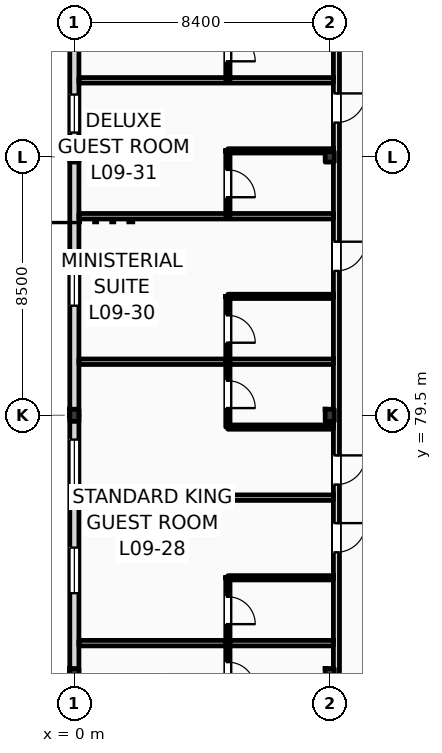
"""IFC4 building model, lengths in metres.
Left out: names, types, materials, properties, quantities, classifications, styles, units other than length and angle.
Written with IfcOpenShell. Run it as: python <this file> out.ifc"""

import sys

from ifc_helpers import new_model, si_unit, direction, frame, frame_2d, origin, origin_2d, place, context, subcontext, project, spatial, rectangle, i_section, extrude, element, fill, save


model = new_model("IFC4")
c1 = context("Model", 3, precision=1e-05, world=origin(), true_north=direction((0.0, 1.0)))
c2 = subcontext(c1, "Body", "Model", "MODEL_VIEW")
j1 = project(units=[si_unit("LENGTHUNIT", "METRE"), si_unit("PLANEANGLEUNIT", "RADIAN")], contexts=[c1])
p1 = place(None, origin())
s1 = spatial("IfcSite", under=j1, at=p1, CompositionType="ELEMENT")
p2 = place(p1, origin())
s2 = spatial("IfcBuilding", under=s1, at=p2, CompositionType="ELEMENT")
p3 = place(p2, frame((0.0, 0.0, 39.0)))
s3 = spatial("IfcBuildingStorey", under=s2, at=p3, CompositionType="ELEMENT", Elevation=39.0)
p4 = place(p3, frame((0.0, 71.0, 0.0), z_axis=(0.0, 0.0, 1.0), x_axis=(1.0, 0.0, 0.0)))
e1 = element("IfcColumn", 1, at=p4, inside=s3, PredefinedType="COLUMN", context=c2, shape_type="SweptSolid", body=[
    extrude(i_section(OverallWidth=0.3, OverallDepth=0.34, WebThickness=0.012, FlangeThickness=0.021, FilletRadius=0.027, at=origin_2d()), origin(), (0.0, 0.0, 1.0), 3.6),
])
p5 = place(p3, frame((0.0, 79.5, 0.0), z_axis=(0.0, 0.0, 1.0), x_axis=(1.0, 0.0, 0.0)))
e2 = element("IfcColumn", 2, at=p5, inside=s3, PredefinedType="COLUMN", context=c2, shape_type="SweptSolid", body=[
    extrude(i_section(OverallWidth=0.3, OverallDepth=0.4, WebThickness=0.013, FlangeThickness=0.024, FilletRadius=0.027, at=origin_2d()), origin(), (0.0, 0.0, 1.0), 3.6),
])
for number, where, z_axis, x_axis in (
    (3, (0.0, 88.0, 0.0), (0.0, 0.0, 1.0), (1.0, 0.0, 0.0)),
    (4, (8.4, 71.0, 0.0), (0.0, 0.0, 1.0), (1.0, 0.0, 0.0)),
):
    element("IfcColumn", number, at=place(p3, frame(where, z_axis=z_axis, x_axis=x_axis)), inside=s3, PredefinedType="COLUMN", context=c2, shape_type="SweptSolid", body=[
        extrude(i_section(OverallWidth=0.3, OverallDepth=0.34, WebThickness=0.012, FlangeThickness=0.021, FilletRadius=0.027, at=origin_2d()), origin(), (0.0, 0.0, 1.0), 3.6),
    ])
p6 = place(p3, frame((8.4, 79.5, 0.0), z_axis=(0.0, 0.0, 1.0), x_axis=(1.0, 0.0, 0.0)))
e5 = element("IfcColumn", 5, at=p6, inside=s3, PredefinedType="COLUMN", context=c2, shape_type="SweptSolid", body=[
    extrude(i_section(OverallWidth=0.3, OverallDepth=0.4, WebThickness=0.013, FlangeThickness=0.024, FilletRadius=0.027, at=origin_2d()), origin(), (0.0, 0.0, 1.0), 3.6),
])
p7 = place(p3, frame((8.4, 88.0, 0.0), z_axis=(0.0, 0.0, 1.0), x_axis=(1.0, 0.0, 0.0)))
e6 = element("IfcColumn", 6, at=p7, inside=s3, PredefinedType="COLUMN", context=c2, shape_type="SweptSolid", body=[
    extrude(i_section(OverallWidth=0.3, OverallDepth=0.34, WebThickness=0.012, FlangeThickness=0.021, FilletRadius=0.027, at=origin_2d()), origin(), (0.0, 0.0, 1.0), 3.6),
])
p8 = place(p3, frame((0.0, 71.0, 0.0), z_axis=(0.0, 0.0, 1.0), x_axis=(0.0, 1.0, 0.0)))
e7 = element("IfcWall", 7, at=p8, inside=s3, PredefinedType="STANDARD", context=c2, shape_type="SweptSolid", body=[
    extrude(rectangle(XDim=8.5, YDim=0.3, at=frame_2d((4.25, 0.0))), origin(), (0.0, 0.0, 1.0), 2.91),
])
p9 = place(p8, frame((2.648, 0.0, 0.9)))
e8 = element("IfcOpeningElement", 8, at=p9, cuts=e7, PredefinedType="OPENING", context=c2, shape_type="SweptSolid", body=[
    extrude(rectangle(XDim=1.5, YDim=1.83, at=frame_2d((0.75, 0.915))), frame((0.0, 0.16, 0.0), z_axis=(0.0, -1.0, 0.0), x_axis=(1.0, 0.0, 0.0)), (0.0, 0.0, 1.0), 0.32),
])
p10 = place(p8, frame((6.2, 0.0, 0.9)))
e9 = element("IfcOpeningElement", 9, at=p10, cuts=e7, PredefinedType="OPENING", context=c2, shape_type="SweptSolid", body=[
    extrude(rectangle(XDim=1.5, YDim=1.83, at=frame_2d((0.75, 0.915))), frame((0.0, 0.16, 0.0), z_axis=(0.0, -1.0, 0.0), x_axis=(1.0, 0.0, 0.0)), (0.0, 0.0, 1.0), 0.32),
])
p11 = place(p3, frame((0.0, 79.5, 0.0), z_axis=(0.0, 0.0, 1.0), x_axis=(0.0, 1.0, 0.0)))
e10 = element("IfcWall", 10, at=p11, inside=s3, PredefinedType="STANDARD", context=c2, shape_type="SweptSolid", body=[
    extrude(rectangle(XDim=8.5, YDim=0.3, at=frame_2d((4.25, 0.0))), origin(), (0.0, 0.0, 1.0), 3.01),
])
p12 = place(p11, frame((3.605, 0.0, 0.9)))
e11 = element("IfcOpeningElement", 11, at=p12, cuts=e10, PredefinedType="OPENING", context=c2, shape_type="SweptSolid", body=[
    extrude(rectangle(XDim=1.1, YDim=1.5, at=frame_2d((0.55, 0.75))), frame((0.0, 0.16, 0.0), z_axis=(0.0, -1.0, 0.0), x_axis=(1.0, 0.0, 0.0)), (0.0, 0.0, 1.0), 0.32),
])
p13 = place(p3, frame((0.0, 88.0, 0.0), z_axis=(0.0, 0.0, 1.0), x_axis=(0.0, 1.0, 0.0)))
e12 = element("IfcWall", 12, at=p13, inside=s3, PredefinedType="STANDARD", context=c2, shape_type="SweptSolid", body=[
    extrude(rectangle(XDim=7.5, YDim=0.3, at=frame_2d((3.75, 0.0))), origin(), (0.0, 0.0, 1.0), 3.38),
])
p14 = place(p13, frame((0.8, 0.0, 0.9)))
e13 = element("IfcOpeningElement", 13, at=p14, cuts=e12, PredefinedType="OPENING", context=c2, shape_type="SweptSolid", body=[
    extrude(rectangle(XDim=1.25, YDim=1.6, at=frame_2d((0.625, 0.8))), frame((0.0, 0.16, 0.0), z_axis=(0.0, -1.0, 0.0), x_axis=(1.0, 0.0, 0.0)), (0.0, 0.0, 1.0), 0.32),
])
p15 = place(p13, frame((4.159, 0.0, 0.9)))
e14 = element("IfcOpeningElement", 14, at=p15, cuts=e12, PredefinedType="OPENING", context=c2, shape_type="SweptSolid", body=[
    extrude(rectangle(XDim=1.4, YDim=1.7, at=frame_2d((0.7, 0.85))), frame((0.0, 0.16, 0.0), z_axis=(0.0, -1.0, 0.0), x_axis=(1.0, 0.0, 0.0)), (0.0, 0.0, 1.0), 0.32),
])
p16 = place(p3, frame((8.62, 62.64, 0.0), z_axis=(0.0, 0.0, 1.0), x_axis=(0.0, 1.0, 0.0)))
e15 = element("IfcWall", 15, at=p16, inside=s3, PredefinedType="PARTITIONING", context=c2, shape_type="SweptSolid", body=[
    extrude(rectangle(XDim=32.66, YDim=0.2, at=frame_2d((16.33, 0.0))), origin(), (0.0, 0.0, 1.0), 2.91),
])
p17 = place(p16, frame((3.122, 0.0, 0.0)))
e16 = element("IfcOpeningElement", 16, at=p17, cuts=e15, PredefinedType="OPENING", context=c2, shape_type="SweptSolid", body=[
    extrude(rectangle(XDim=0.96, YDim=2.2, at=frame_2d((0.48, 1.1))), frame((0.0, 0.11, 0.0), z_axis=(0.0, -1.0, 0.0), x_axis=(1.0, 0.0, 0.0)), (0.0, 0.0, 1.0), 0.22),
])
p18 = place(p16, frame((5.575, 0.0, 0.0)))
e17 = element("IfcOpeningElement", 17, at=p18, cuts=e15, PredefinedType="OPENING", context=c2, shape_type="SweptSolid", body=[
    extrude(rectangle(XDim=0.96, YDim=2.2, at=frame_2d((0.48, 1.1))), frame((0.0, 0.11, 0.0), z_axis=(0.0, -1.0, 0.0), x_axis=(1.0, 0.0, 0.0)), (0.0, 0.0, 1.0), 0.22),
])
p19 = place(p16, frame((12.353, 0.0, 0.0)))
e18 = element("IfcOpeningElement", 18, at=p19, cuts=e15, PredefinedType="OPENING", context=c2, shape_type="SweptSolid", body=[
    extrude(rectangle(XDim=0.96, YDim=2.2, at=frame_2d((0.48, 1.1))), frame((0.0, 0.11, 0.0), z_axis=(0.0, -1.0, 0.0), x_axis=(1.0, 0.0, 0.0)), (0.0, 0.0, 1.0), 0.22),
])
p20 = place(p16, frame((14.581, 0.0, 0.0)))
e19 = element("IfcOpeningElement", 19, at=p20, cuts=e15, PredefinedType="OPENING", context=c2, shape_type="SweptSolid", body=[
    extrude(rectangle(XDim=0.96, YDim=2.2, at=frame_2d((0.48, 1.1))), frame((0.0, 0.11, 0.0), z_axis=(0.0, -1.0, 0.0), x_axis=(1.0, 0.0, 0.0)), (0.0, 0.0, 1.0), 0.22),
])
p21 = place(p16, frame((21.61, 0.0, 0.0)))
e20 = element("IfcOpeningElement", 20, at=p21, cuts=e15, PredefinedType="OPENING", context=c2, shape_type="SweptSolid", body=[
    extrude(rectangle(XDim=0.96, YDim=2.2, at=frame_2d((0.48, 1.1))), frame((0.0, 0.11, 0.0), z_axis=(0.0, -1.0, 0.0), x_axis=(1.0, 0.0, 0.0)), (0.0, 0.0, 1.0), 0.22),
])
p22 = place(p16, frame((26.488, 0.0, 0.0)))
e21 = element("IfcOpeningElement", 21, at=p22, cuts=e15, PredefinedType="OPENING", context=c2, shape_type="SweptSolid", body=[
    extrude(rectangle(XDim=0.96, YDim=2.2, at=frame_2d((0.48, 1.1))), frame((0.0, 0.11, 0.0), z_axis=(0.0, -1.0, 0.0), x_axis=(1.0, 0.0, 0.0)), (0.0, 0.0, 1.0), 0.22),
])
p23 = place(p16, frame((30.814, 0.0, 0.0)))
e22 = element("IfcOpeningElement", 22, at=p23, cuts=e15, PredefinedType="OPENING", context=c2, shape_type="SweptSolid", body=[
    extrude(rectangle(XDim=0.96, YDim=2.2, at=frame_2d((0.48, 1.1))), frame((0.0, 0.11, 0.0), z_axis=(0.0, -1.0, 0.0), x_axis=(1.0, 0.0, 0.0)), (0.0, 0.0, 1.0), 0.22),
])
p24 = place(p3, frame((0.15, 72.005, 0.0), z_axis=(0.0, 0.0, 1.0), x_axis=(1.0, 0.0, 0.0)))
e23 = element("IfcWall", 23, at=p24, inside=s3, PredefinedType="PARTITIONING", context=c2, shape_type="SweptSolid", body=[
    extrude(rectangle(XDim=8.37, YDim=0.18, at=frame_2d((4.185, 0.0))), origin(), (0.0, 0.0, 1.0), 3.38),
])
p25 = place(p3, frame((5.05, 69.855, 0.0), z_axis=(0.0, 0.0, 1.0), x_axis=(0.0, 1.0, 0.0)))
e24 = element("IfcWall", 24, at=p25, inside=s3, PredefinedType="PARTITIONING", context=c2, shape_type="SweptSolid", body=[
    extrude(rectangle(XDim=2.15, YDim=0.14, at=frame_2d((1.075, 0.0))), origin(), (0.0, 0.0, 1.0), 3.38),
])
p26 = place(p25, frame((0.625, 0.0, 0.0)))
e25 = element("IfcOpeningElement", 25, at=p26, cuts=e24, PredefinedType="OPENING", context=c2, shape_type="SweptSolid", body=[
    extrude(rectangle(XDim=0.9, YDim=2.1, at=frame_2d((0.45, 1.05))), frame((0.0, 0.08, 0.0), z_axis=(0.0, -1.0, 0.0), x_axis=(1.0, 0.0, 0.0)), (0.0, 0.0, 1.0), 0.16),
])
p27 = place(p3, frame((0.15, 76.791, 0.0), z_axis=(0.0, 0.0, 1.0), x_axis=(1.0, 0.0, 0.0)))
e26 = element("IfcWall", 26, at=p27, inside=s3, PredefinedType="PARTITIONING", context=c2, shape_type="SweptSolid", body=[
    extrude(rectangle(XDim=8.37, YDim=0.18, at=frame_2d((4.185, 0.0))), origin(), (0.0, 0.0, 1.0), 3.38),
])
p28 = place(p3, frame((5.05, 74.155, 0.0), z_axis=(0.0, 0.0, 1.0), x_axis=(1.0, 0.0, 0.0)))
e27 = element("IfcWall", 27, at=p28, inside=s3, PredefinedType="PARTITIONING", context=c2, shape_type="SweptSolid", body=[
    extrude(rectangle(XDim=3.47, YDim=0.14, at=frame_2d((1.735, 0.0))), origin(), (0.0, 0.0, 1.0), 3.38),
])
p29 = place(p3, frame((5.05, 72.005, 0.0), z_axis=(0.0, 0.0, 1.0), x_axis=(0.0, 1.0, 0.0)))
e28 = element("IfcWall", 28, at=p29, inside=s3, PredefinedType="PARTITIONING", context=c2, shape_type="SweptSolid", body=[
    extrude(rectangle(XDim=2.15, YDim=0.14, at=frame_2d((1.075, 0.0))), origin(), (0.0, 0.0, 1.0), 3.38),
])
p30 = place(p29, frame((0.625, 0.0, 0.0)))
e29 = element("IfcOpeningElement", 29, at=p30, cuts=e28, PredefinedType="OPENING", context=c2, shape_type="SweptSolid", body=[
    extrude(rectangle(XDim=0.9, YDim=2.1, at=frame_2d((0.45, 1.05))), frame((0.0, 0.08, 0.0), z_axis=(0.0, -1.0, 0.0), x_axis=(1.0, 0.0, 0.0)), (0.0, 0.0, 1.0), 0.16),
])
p31 = place(p3, frame((0.15, 81.262, 0.0), z_axis=(0.0, 0.0, 1.0), x_axis=(1.0, 0.0, 0.0)))
e30 = element("IfcWall", 30, at=p31, inside=s3, PredefinedType="PARTITIONING", context=c2, shape_type="SweptSolid", body=[
    extrude(rectangle(XDim=8.37, YDim=0.18, at=frame_2d((4.185, 0.0))), origin(), (0.0, 0.0, 1.0), 3.38),
])
p32 = place(p3, frame((5.05, 79.112, 0.0), z_axis=(0.0, 0.0, 1.0), x_axis=(1.0, 0.0, 0.0)))
e31 = element("IfcWall", 31, at=p32, inside=s3, PredefinedType="PARTITIONING", context=c2, shape_type="SweptSolid", body=[
    extrude(rectangle(XDim=3.47, YDim=0.14, at=frame_2d((1.735, 0.0))), origin(), (0.0, 0.0, 1.0), 3.38),
])
p33 = place(p3, frame((5.05, 79.112, 0.0), z_axis=(0.0, 0.0, 1.0), x_axis=(0.0, 1.0, 0.0)))
e32 = element("IfcWall", 32, at=p33, inside=s3, PredefinedType="PARTITIONING", context=c2, shape_type="SweptSolid", body=[
    extrude(rectangle(XDim=2.15, YDim=0.14, at=frame_2d((1.075, 0.0))), origin(), (0.0, 0.0, 1.0), 3.38),
])
p34 = place(p33, frame((0.625, 0.0, 0.0)))
e33 = element("IfcOpeningElement", 33, at=p34, cuts=e32, PredefinedType="OPENING", context=c2, shape_type="SweptSolid", body=[
    extrude(rectangle(XDim=0.9, YDim=2.1, at=frame_2d((0.45, 1.05))), frame((0.0, 0.08, 0.0), z_axis=(0.0, -1.0, 0.0), x_axis=(1.0, 0.0, 0.0)), (0.0, 0.0, 1.0), 0.16),
])
p35 = place(p3, frame((0.15, 86.048, 0.0), z_axis=(0.0, 0.0, 1.0), x_axis=(1.0, 0.0, 0.0)))
e34 = element("IfcWall", 34, at=p35, inside=s3, PredefinedType="PARTITIONING", context=c2, shape_type="SweptSolid", body=[
    extrude(rectangle(XDim=8.37, YDim=0.18, at=frame_2d((4.185, 0.0))), origin(), (0.0, 0.0, 1.0), 3.38),
])
p36 = place(p3, frame((5.05, 83.412, 0.0), z_axis=(0.0, 0.0, 1.0), x_axis=(1.0, 0.0, 0.0)))
e35 = element("IfcWall", 35, at=p36, inside=s3, PredefinedType="PARTITIONING", context=c2, shape_type="SweptSolid", body=[
    extrude(rectangle(XDim=3.47, YDim=0.14, at=frame_2d((1.735, 0.0))), origin(), (0.0, 0.0, 1.0), 3.38),
])
p37 = place(p3, frame((5.05, 81.262, 0.0), z_axis=(0.0, 0.0, 1.0), x_axis=(0.0, 1.0, 0.0)))
e36 = element("IfcWall", 36, at=p37, inside=s3, PredefinedType="PARTITIONING", context=c2, shape_type="SweptSolid", body=[
    extrude(rectangle(XDim=2.15, YDim=0.14, at=frame_2d((1.075, 0.0))), origin(), (0.0, 0.0, 1.0), 3.38),
])
p38 = place(p37, frame((0.625, 0.0, 0.0)))
e37 = element("IfcOpeningElement", 37, at=p38, cuts=e36, PredefinedType="OPENING", context=c2, shape_type="SweptSolid", body=[
    extrude(rectangle(XDim=0.9, YDim=2.1, at=frame_2d((0.45, 1.05))), frame((0.0, 0.08, 0.0), z_axis=(0.0, -1.0, 0.0), x_axis=(1.0, 0.0, 0.0)), (0.0, 0.0, 1.0), 0.16),
])
p39 = place(p3, frame((0.15, 90.519, 0.0), z_axis=(0.0, 0.0, 1.0), x_axis=(1.0, 0.0, 0.0)))
e38 = element("IfcWall", 38, at=p39, inside=s3, PredefinedType="PARTITIONING", context=c2, shape_type="SweptSolid", body=[
    extrude(rectangle(XDim=8.37, YDim=0.18, at=frame_2d((4.185, 0.0))), origin(), (0.0, 0.0, 1.0), 3.38),
])
p40 = place(p3, frame((5.05, 88.198, 0.0), z_axis=(0.0, 0.0, 1.0), x_axis=(1.0, 0.0, 0.0)))
e39 = element("IfcWall", 39, at=p40, inside=s3, PredefinedType="PARTITIONING", context=c2, shape_type="SweptSolid", body=[
    extrude(rectangle(XDim=3.47, YDim=0.14, at=frame_2d((1.735, 0.0))), origin(), (0.0, 0.0, 1.0), 2.82),
])
p41 = place(p3, frame((5.05, 86.048, 0.0), z_axis=(0.0, 0.0, 1.0), x_axis=(0.0, 1.0, 0.0)))
e40 = element("IfcWall", 40, at=p41, inside=s3, PredefinedType="PARTITIONING", context=c2, shape_type="SweptSolid", body=[
    extrude(rectangle(XDim=2.15, YDim=0.14, at=frame_2d((1.075, 0.0))), origin(), (0.0, 0.0, 1.0), 3.38),
])
p42 = place(p41, frame((0.625, 0.0, 0.0)))
e41 = element("IfcOpeningElement", 41, at=p42, cuts=e40, PredefinedType="OPENING", context=c2, shape_type="SweptSolid", body=[
    extrude(rectangle(XDim=0.9, YDim=2.1, at=frame_2d((0.45, 1.05))), frame((0.0, 0.08, 0.0), z_axis=(0.0, -1.0, 0.0), x_axis=(1.0, 0.0, 0.0)), (0.0, 0.0, 1.0), 0.16),
])
p43 = place(p3, frame((5.05, 90.519, 0.0), z_axis=(0.0, 0.0, 1.0), x_axis=(0.0, 1.0, 0.0)))
e42 = element("IfcWall", 42, at=p43, inside=s3, PredefinedType="PARTITIONING", context=c2, shape_type="SweptSolid", body=[
    extrude(rectangle(XDim=2.15, YDim=0.14, at=frame_2d((1.075, 0.0))), origin(), (0.0, 0.0, 1.0), 3.38),
])
p44 = place(p43, frame((0.625, 0.0, 0.0)))
e43 = element("IfcOpeningElement", 43, at=p44, cuts=e42, PredefinedType="OPENING", context=c2, shape_type="SweptSolid", body=[
    extrude(rectangle(XDim=0.9, YDim=2.1, at=frame_2d((0.45, 1.05))), frame((0.0, 0.08, 0.0), z_axis=(0.0, -1.0, 0.0), x_axis=(1.0, 0.0, 0.0)), (0.0, 0.0, 1.0), 0.16),
])
p45 = place(p9, origin())
e44 = element("IfcWindow", 44, at=p45, inside=s3, PartitioningType="DOUBLE_PANEL_VERTICAL", PredefinedType="WINDOW", context=c2, shape_type="SweptSolid", body=[
    extrude(rectangle(XDim=1.5, YDim=1.83, at=frame_2d((0.75, 0.915))), frame((0.0, 0.03, 0.0), z_axis=(0.0, -1.0, 0.0), x_axis=(1.0, 0.0, 0.0)), (0.0, 0.0, 1.0), 0.06),
])
fill(e8, e44)
p46 = place(p10, origin())
e45 = element("IfcWindow", 45, at=p46, inside=s3, PartitioningType="DOUBLE_PANEL_VERTICAL", PredefinedType="WINDOW", context=c2, shape_type="SweptSolid", body=[
    extrude(rectangle(XDim=1.5, YDim=1.83, at=frame_2d((0.75, 0.915))), frame((0.0, 0.03, 0.0), z_axis=(0.0, -1.0, 0.0), x_axis=(1.0, 0.0, 0.0)), (0.0, 0.0, 1.0), 0.06),
])
fill(e9, e45)
p47 = place(p12, origin())
e46 = element("IfcWindow", 46, at=p47, inside=s3, PartitioningType="DOUBLE_PANEL_VERTICAL", PredefinedType="WINDOW", context=c2, shape_type="SweptSolid", body=[
    extrude(rectangle(XDim=1.1, YDim=1.5, at=frame_2d((0.55, 0.75))), frame((0.0, 0.03, 0.0), z_axis=(0.0, -1.0, 0.0), x_axis=(1.0, 0.0, 0.0)), (0.0, 0.0, 1.0), 0.06),
])
fill(e11, e46)
p48 = place(p14, origin())
e47 = element("IfcWindow", 47, at=p48, inside=s3, PartitioningType="DOUBLE_PANEL_VERTICAL", PredefinedType="WINDOW", context=c2, shape_type="SweptSolid", body=[
    extrude(rectangle(XDim=1.25, YDim=1.6, at=frame_2d((0.625, 0.8))), frame((0.0, 0.03, 0.0), z_axis=(0.0, -1.0, 0.0), x_axis=(1.0, 0.0, 0.0)), (0.0, 0.0, 1.0), 0.06),
])
fill(e13, e47)
p49 = place(p26, frame((0.9, 0.0, 0.0), z_axis=(0.0, 0.0, 1.0), x_axis=(-1.0, 0.0, 0.0)))
e48 = element("IfcDoor", 48, at=p49, inside=s3, OperationType="SINGLE_SWING_LEFT", PredefinedType="DOOR", context=c2, shape_type="SweptSolid", body=[
    extrude(rectangle(XDim=0.9, YDim=2.1, at=frame_2d((0.45, 1.05))), frame((0.0, 0.025, 0.0), z_axis=(0.0, -1.0, 0.0), x_axis=(1.0, 0.0, 0.0)), (0.0, 0.0, 1.0), 0.05),
])
fill(e25, e48)
p50 = place(p19, frame((0.96, 0.0, 0.0), z_axis=(0.0, 0.0, 1.0), x_axis=(-1.0, 0.0, 0.0)))
e49 = element("IfcDoor", 49, at=p50, inside=s3, OperationType="SINGLE_SWING_RIGHT", PredefinedType="DOOR", context=c2, shape_type="SweptSolid", body=[
    extrude(rectangle(XDim=0.96, YDim=2.2, at=frame_2d((0.48, 1.1))), frame((0.0, 0.025, 0.0), z_axis=(0.0, -1.0, 0.0), x_axis=(1.0, 0.0, 0.0)), (0.0, 0.0, 1.0), 0.05),
])
fill(e18, e49)
p51 = place(p30, frame((0.9, 0.0, 0.0), z_axis=(0.0, 0.0, 1.0), x_axis=(-1.0, 0.0, 0.0)))
e50 = element("IfcDoor", 50, at=p51, inside=s3, OperationType="SINGLE_SWING_LEFT", PredefinedType="DOOR", context=c2, shape_type="SweptSolid", body=[
    extrude(rectangle(XDim=0.9, YDim=2.1, at=frame_2d((0.45, 1.05))), frame((0.0, 0.025, 0.0), z_axis=(0.0, -1.0, 0.0), x_axis=(1.0, 0.0, 0.0)), (0.0, 0.0, 1.0), 0.05),
])
fill(e29, e50)
p52 = place(p20, frame((0.96, 0.0, 0.0), z_axis=(0.0, 0.0, 1.0), x_axis=(-1.0, 0.0, 0.0)))
e51 = element("IfcDoor", 51, at=p52, inside=s3, OperationType="SINGLE_SWING_RIGHT", PredefinedType="DOOR", context=c2, shape_type="SweptSolid", body=[
    extrude(rectangle(XDim=0.96, YDim=2.2, at=frame_2d((0.48, 1.1))), frame((0.0, 0.025, 0.0), z_axis=(0.0, -1.0, 0.0), x_axis=(1.0, 0.0, 0.0)), (0.0, 0.0, 1.0), 0.05),
])
fill(e19, e51)
p53 = place(p34, frame((0.9, 0.0, 0.0), z_axis=(0.0, 0.0, 1.0), x_axis=(-1.0, 0.0, 0.0)))
e52 = element("IfcDoor", 52, at=p53, inside=s3, OperationType="SINGLE_SWING_LEFT", PredefinedType="DOOR", context=c2, shape_type="SweptSolid", body=[
    extrude(rectangle(XDim=0.9, YDim=2.1, at=frame_2d((0.45, 1.05))), frame((0.0, 0.025, 0.0), z_axis=(0.0, -1.0, 0.0), x_axis=(1.0, 0.0, 0.0)), (0.0, 0.0, 1.0), 0.05),
])
fill(e33, e52)
p54 = place(p21, frame((0.96, 0.0, 0.0), z_axis=(0.0, 0.0, 1.0), x_axis=(-1.0, 0.0, 0.0)))
e53 = element("IfcDoor", 53, at=p54, inside=s3, OperationType="SINGLE_SWING_RIGHT", PredefinedType="DOOR", context=c2, shape_type="SweptSolid", body=[
    extrude(rectangle(XDim=0.96, YDim=2.2, at=frame_2d((0.48, 1.1))), frame((0.0, 0.025, 0.0), z_axis=(0.0, -1.0, 0.0), x_axis=(1.0, 0.0, 0.0)), (0.0, 0.0, 1.0), 0.05),
])
fill(e20, e53)
p55 = place(p38, frame((0.9, 0.0, 0.0), z_axis=(0.0, 0.0, 1.0), x_axis=(-1.0, 0.0, 0.0)))
e54 = element("IfcDoor", 54, at=p55, inside=s3, OperationType="SINGLE_SWING_LEFT", PredefinedType="DOOR", context=c2, shape_type="SweptSolid", body=[
    extrude(rectangle(XDim=0.9, YDim=2.1, at=frame_2d((0.45, 1.05))), frame((0.0, 0.025, 0.0), z_axis=(0.0, -1.0, 0.0), x_axis=(1.0, 0.0, 0.0)), (0.0, 0.0, 1.0), 0.05),
])
fill(e37, e54)
p56 = place(p22, frame((0.96, 0.0, 0.0), z_axis=(0.0, 0.0, 1.0), x_axis=(-1.0, 0.0, 0.0)))
e55 = element("IfcDoor", 55, at=p56, inside=s3, OperationType="SINGLE_SWING_RIGHT", PredefinedType="DOOR", context=c2, shape_type="SweptSolid", body=[
    extrude(rectangle(XDim=0.96, YDim=2.2, at=frame_2d((0.48, 1.1))), frame((0.0, 0.025, 0.0), z_axis=(0.0, -1.0, 0.0), x_axis=(1.0, 0.0, 0.0)), (0.0, 0.0, 1.0), 0.05),
])
fill(e21, e55)
p57 = place(p42, frame((0.9, 0.0, 0.0), z_axis=(0.0, 0.0, 1.0), x_axis=(-1.0, 0.0, 0.0)))
e56 = element("IfcDoor", 56, at=p57, inside=s3, OperationType="SINGLE_SWING_LEFT", PredefinedType="DOOR", context=c2, shape_type="SweptSolid", body=[
    extrude(rectangle(XDim=0.9, YDim=2.1, at=frame_2d((0.45, 1.05))), frame((0.0, 0.025, 0.0), z_axis=(0.0, -1.0, 0.0), x_axis=(1.0, 0.0, 0.0)), (0.0, 0.0, 1.0), 0.05),
])
fill(e41, e56)
p58 = place(p44, frame((0.9, 0.0, 0.0), z_axis=(0.0, 0.0, 1.0), x_axis=(-1.0, 0.0, 0.0)))
e57 = element("IfcDoor", 57, at=p58, inside=s3, OperationType="SINGLE_SWING_LEFT", PredefinedType="DOOR", context=c2, shape_type="SweptSolid", body=[
    extrude(rectangle(XDim=0.9, YDim=2.1, at=frame_2d((0.45, 1.05))), frame((0.0, 0.025, 0.0), z_axis=(0.0, -1.0, 0.0), x_axis=(1.0, 0.0, 0.0)), (0.0, 0.0, 1.0), 0.05),
])
fill(e43, e57)
save(model, sys.argv[1])
